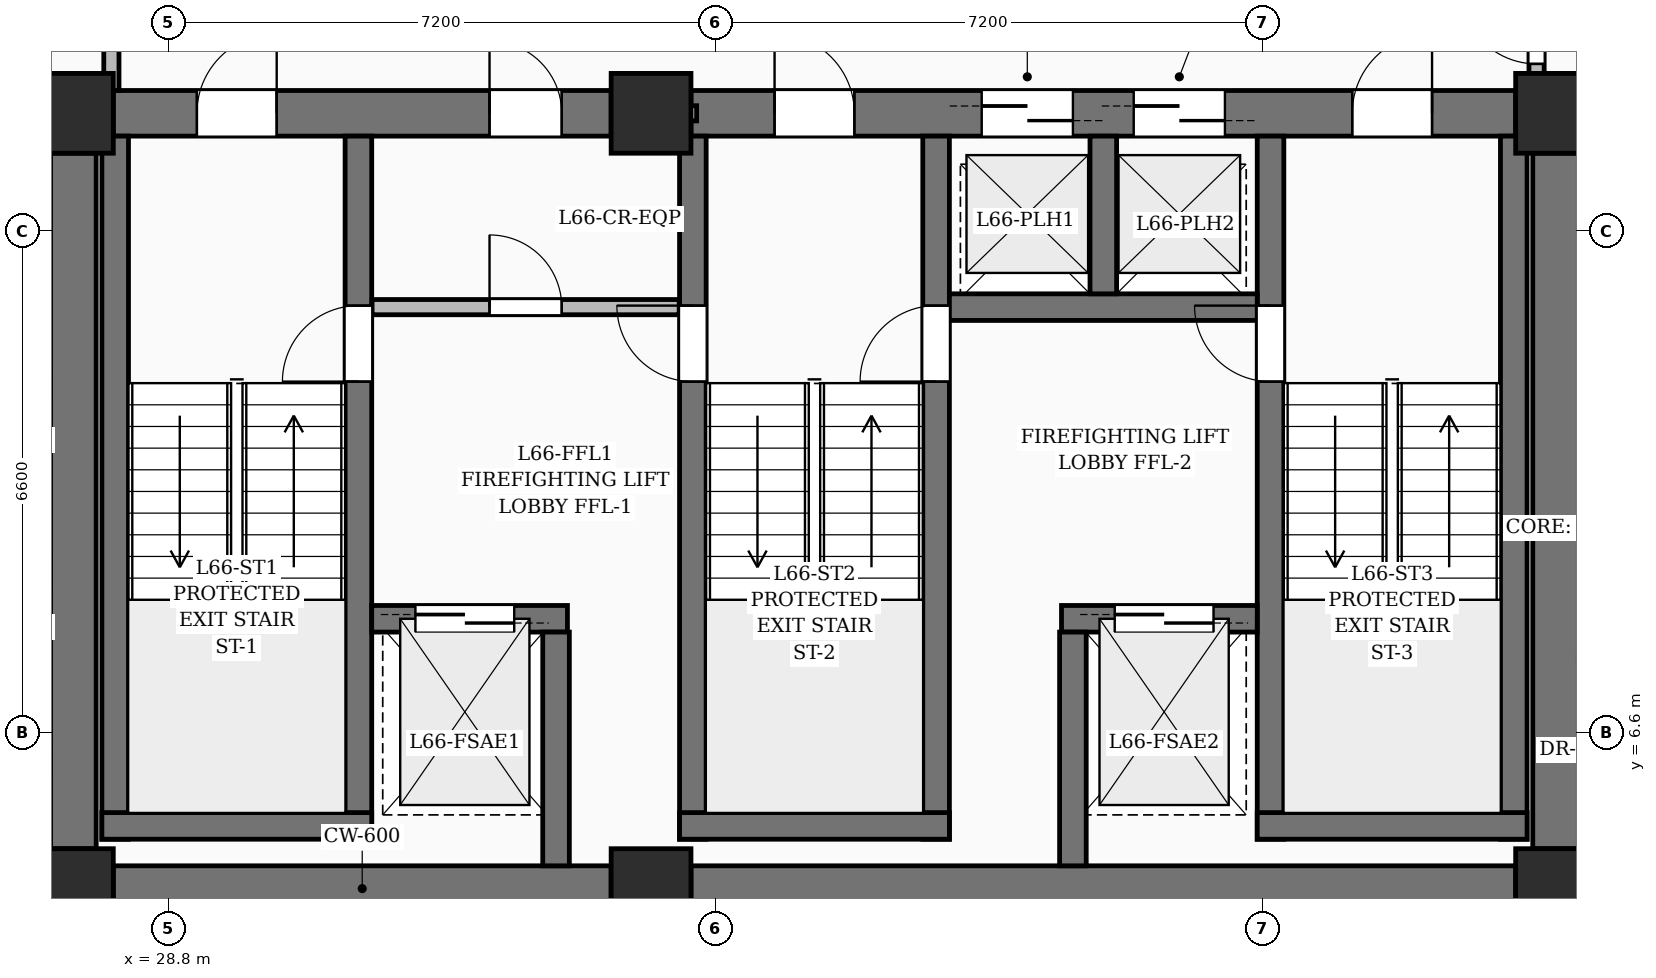
"""IFC4 building model, lengths in metres.
Left out: names, types, materials, properties, quantities, classifications, styles, units other than length and angle.
Written with IfcOpenShell. Run it as: python <this file> out.ifc"""

import sys

from ifc_helpers import new_model, si_unit, direction, frame, frame_2d, origin, origin_2d, place, context, subcontext, project, spatial, rectangle, extrude, element, fill, save


model = new_model("IFC4")
c1 = context("Model", 3, precision=1e-05, world=origin(), true_north=direction((0.0, 1.0)))
c2 = subcontext(c1, "Body", "Model", "MODEL_VIEW")
j1 = project(units=[si_unit("LENGTHUNIT", "METRE"), si_unit("PLANEANGLEUNIT", "RADIAN")], contexts=[c1])
p1 = place(None, origin())
s1 = spatial("IfcSite", under=j1, at=p1, CompositionType="ELEMENT")
p2 = place(p1, origin())
s2 = spatial("IfcBuilding", under=s1, at=p2, CompositionType="ELEMENT")
p3 = place(p2, frame((0.0, 0.0, 255.75)))
s3 = spatial("IfcBuildingStorey", under=s2, at=p3, CompositionType="ELEMENT", Elevation=255.75)
for number, where, z_axis, x_axis in (
    (1, (27.55, 4.55, 0.0), (0.0, 0.0, 1.0), (1.0, 0.0, 0.0)),
    (2, (35.15, 4.55, 0.0), (0.0, 0.0, 1.0), (1.0, 0.0, 0.0)),
    (3, (47.05, 4.55, 0.0), (0.0, 0.0, 1.0), (1.0, 0.0, 0.0)),
    (4, (27.55, 14.75, 0.0), (0.0, 0.0, 1.0), (1.0, 0.0, 0.0)),
    (5, (35.15, 14.75, 0.0), (0.0, 0.0, 1.0), (1.0, 0.0, 0.0)),
    (6, (47.05, 14.75, 0.0), (0.0, 0.0, 1.0), (1.0, 0.0, 0.0)),
):
    element("IfcColumn", number, at=place(p3, frame(where, z_axis=z_axis, x_axis=x_axis)), inside=s3, PredefinedType="COLUMN", context=c2, shape_type="SweptSolid", body=[
        extrude(rectangle(XDim=1.05, YDim=1.05, at=origin_2d()), origin(), (0.0, 0.0, 1.0), 3.75),
    ])
p4 = place(p3, frame((28.075, 4.55, 0.0), z_axis=(0.0, 0.0, 1.0), x_axis=(1.0, 0.0, 0.0)))
e7 = element("IfcWall", 7, at=p4, inside=s3, PredefinedType="SHEAR", context=c2, shape_type="SweptSolid", body=[
    extrude(rectangle(XDim=6.55, YDim=0.6, at=frame_2d((3.275, 0.0))), origin(), (0.0, 0.0, 1.0), 3.75),
])
p5 = place(p3, frame((35.675, 4.55, 0.0), z_axis=(0.0, 0.0, 1.0), x_axis=(1.0, 0.0, 0.0)))
e8 = element("IfcWall", 8, at=p5, inside=s3, PredefinedType="SHEAR", context=c2, shape_type="SweptSolid", body=[
    extrude(rectangle(XDim=10.85, YDim=0.6, at=frame_2d((5.425, 0.0))), origin(), (0.0, 0.0, 1.0), 3.75),
])
p6 = place(p3, frame((28.075, 14.75, 0.0), z_axis=(0.0, 0.0, 1.0), x_axis=(1.0, 0.0, 0.0)))
e9 = element("IfcWall", 9, at=p6, inside=s3, PredefinedType="SHEAR", context=c2, shape_type="SweptSolid", body=[
    extrude(rectangle(XDim=6.55, YDim=0.6, at=frame_2d((3.275, 0.0))), origin(), (0.0, 0.0, 1.0), 3.75),
])
p7 = place(p6, frame((1.1, 0.0, 0.0)))
e10 = element("IfcOpeningElement", 10, at=p7, cuts=e9, PredefinedType="OPENING", context=c2, shape_type="SweptSolid", body=[
    extrude(rectangle(XDim=1.05, YDim=2.15, at=frame_2d((0.525, 1.075))), frame((0.0, 0.31, 0.0), z_axis=(0.0, -1.0, 0.0), x_axis=(1.0, 0.0, 0.0)), (0.0, 0.0, 1.0), 0.62),
])
p8 = place(p6, frame((4.95, 0.0, 0.0)))
e11 = element("IfcOpeningElement", 11, at=p8, cuts=e9, PredefinedType="OPENING", context=c2, shape_type="SweptSolid", body=[
    extrude(rectangle(XDim=0.95, YDim=2.15, at=frame_2d((0.475, 1.075))), frame((0.0, 0.31, 0.0), z_axis=(0.0, -1.0, 0.0), x_axis=(1.0, 0.0, 0.0)), (0.0, 0.0, 1.0), 0.62),
])
p9 = place(p3, frame((35.675, 14.75, 0.0), z_axis=(0.0, 0.0, 1.0), x_axis=(1.0, 0.0, 0.0)))
e12 = element("IfcWall", 12, at=p9, inside=s3, PredefinedType="SHEAR", context=c2, shape_type="SweptSolid", body=[
    extrude(rectangle(XDim=10.85, YDim=0.6, at=frame_2d((5.425, 0.0))), origin(), (0.0, 0.0, 1.0), 3.75),
])
p10 = place(p9, frame((1.1, 0.0, 0.0)))
e13 = element("IfcOpeningElement", 13, at=p10, cuts=e12, PredefinedType="OPENING", context=c2, shape_type="SweptSolid", body=[
    extrude(rectangle(XDim=1.05, YDim=2.15, at=frame_2d((0.525, 1.075))), frame((0.0, 0.31, 0.0), z_axis=(0.0, -1.0, 0.0), x_axis=(1.0, 0.0, 0.0)), (0.0, 0.0, 1.0), 0.62),
])
p11 = place(p9, frame((8.7, 0.0, 0.0)))
e14 = element("IfcOpeningElement", 14, at=p11, cuts=e12, PredefinedType="OPENING", context=c2, shape_type="SweptSolid", body=[
    extrude(rectangle(XDim=1.05, YDim=2.15, at=frame_2d((0.525, 1.075))), frame((0.0, 0.31, 0.0), z_axis=(0.0, -1.0, 0.0), x_axis=(1.0, 0.0, 0.0)), (0.0, 0.0, 1.0), 0.62),
])
p12 = place(p9, frame((3.825, 0.0, 0.0)))
e15 = element("IfcOpeningElement", 15, at=p12, cuts=e12, PredefinedType="OPENING", context=c2, shape_type="SweptSolid", body=[
    extrude(rectangle(XDim=1.2, YDim=2.2, at=frame_2d((0.6, 1.1))), frame((0.0, 0.31, 0.0), z_axis=(0.0, -1.0, 0.0), x_axis=(1.0, 0.0, 0.0)), (0.0, 0.0, 1.0), 0.62),
])
p13 = place(p9, frame((5.825, 0.0, 0.0)))
e16 = element("IfcOpeningElement", 16, at=p13, cuts=e12, PredefinedType="OPENING", context=c2, shape_type="SweptSolid", body=[
    extrude(rectangle(XDim=1.2, YDim=2.2, at=frame_2d((0.6, 1.1))), frame((0.0, 0.31, 0.0), z_axis=(0.0, -1.0, 0.0), x_axis=(1.0, 0.0, 0.0)), (0.0, 0.0, 1.0), 0.62),
])
for number, where, z_axis, x_axis in (
    (17, (27.55, 5.075, 0.0), (0.0, 0.0, 1.0), (0.0, 1.0, 0.0)),
    (18, (47.05, 5.075, 0.0), (0.0, 0.0, 1.0), (0.0, 1.0, 0.0)),
):
    element("IfcWall", number, at=place(p3, frame(where, z_axis=z_axis, x_axis=x_axis)), inside=s3, PredefinedType="SHEAR", context=c2, shape_type="SweptSolid", body=[
        extrude(rectangle(XDim=9.15, YDim=0.6, at=frame_2d((4.575, 0.0))), origin(), (0.0, 0.0, 1.0), 3.75),
    ])
p14 = place(p3, frame((28.1, 5.2, 0.0), z_axis=(0.0, 0.0, 1.0), x_axis=(0.0, 1.0, 0.0)))
e19 = element("IfcWall", 19, at=p14, inside=s3, PredefinedType="SOLIDWALL", context=c2, shape_type="SweptSolid", body=[
    extrude(rectangle(XDim=9.25, YDim=0.35, at=frame_2d((4.625, 0.0))), origin(), (0.0, 0.0, 1.0), 3.75),
])
p15 = place(p3, frame((31.3, 5.2, 0.0), z_axis=(0.0, 0.0, 1.0), x_axis=(0.0, 1.0, 0.0)))
e20 = element("IfcWall", 20, at=p15, inside=s3, PredefinedType="SOLIDWALL", context=c2, shape_type="SweptSolid", body=[
    extrude(rectangle(XDim=9.25, YDim=0.35, at=frame_2d((4.625, 0.0))), origin(), (0.0, 0.0, 1.0), 3.75),
])
p16 = place(p15, frame((6.02, 0.0, 0.0)))
e21 = element("IfcOpeningElement", 21, at=p16, cuts=e20, PredefinedType="OPENING", context=c2, shape_type="SweptSolid", body=[
    extrude(rectangle(XDim=1.0, YDim=2.15, at=frame_2d((0.5, 1.075))), frame((0.0, 0.185, 0.0), z_axis=(0.0, -1.0, 0.0), x_axis=(1.0, 0.0, 0.0)), (0.0, 0.0, 1.0), 0.37),
])
p17 = place(p3, frame((27.925, 5.375, 0.0), z_axis=(0.0, 0.0, 1.0), x_axis=(1.0, 0.0, 0.0)))
e22 = element("IfcWall", 22, at=p17, inside=s3, PredefinedType="SOLIDWALL", context=c2, shape_type="SweptSolid", body=[
    extrude(rectangle(XDim=3.55, YDim=0.35, at=frame_2d((1.775, 0.0))), origin(), (0.0, 0.0, 1.0), 3.75),
])
p18 = place(p3, frame((35.7, 5.2, 0.0), z_axis=(0.0, 0.0, 1.0), x_axis=(0.0, 1.0, 0.0)))
e23 = element("IfcWall", 23, at=p18, inside=s3, PredefinedType="SOLIDWALL", context=c2, shape_type="SweptSolid", body=[
    extrude(rectangle(XDim=9.25, YDim=0.35, at=frame_2d((4.625, 0.0))), origin(), (0.0, 0.0, 1.0), 3.75),
])
p19 = place(p18, frame((6.02, 0.0, 0.0)))
e24 = element("IfcOpeningElement", 24, at=p19, cuts=e23, PredefinedType="OPENING", context=c2, shape_type="SweptSolid", body=[
    extrude(rectangle(XDim=1.0, YDim=2.15, at=frame_2d((0.5, 1.075))), frame((0.0, 0.185, 0.0), z_axis=(0.0, -1.0, 0.0), x_axis=(1.0, 0.0, 0.0)), (0.0, 0.0, 1.0), 0.37),
])
p20 = place(p3, frame((38.9, 5.2, 0.0), z_axis=(0.0, 0.0, 1.0), x_axis=(0.0, 1.0, 0.0)))
e25 = element("IfcWall", 25, at=p20, inside=s3, PredefinedType="SOLIDWALL", context=c2, shape_type="SweptSolid", body=[
    extrude(rectangle(XDim=9.25, YDim=0.35, at=frame_2d((4.625, 0.0))), origin(), (0.0, 0.0, 1.0), 3.75),
])
p21 = place(p20, frame((6.02, 0.0, 0.0)))
e26 = element("IfcOpeningElement", 26, at=p21, cuts=e25, PredefinedType="OPENING", context=c2, shape_type="SweptSolid", body=[
    extrude(rectangle(XDim=1.0, YDim=2.15, at=frame_2d((0.5, 1.075))), frame((0.0, 0.185, 0.0), z_axis=(0.0, -1.0, 0.0), x_axis=(1.0, 0.0, 0.0)), (0.0, 0.0, 1.0), 0.37),
])
p22 = place(p3, frame((35.525, 5.375, 0.0), z_axis=(0.0, 0.0, 1.0), x_axis=(1.0, 0.0, 0.0)))
e27 = element("IfcWall", 27, at=p22, inside=s3, PredefinedType="SOLIDWALL", context=c2, shape_type="SweptSolid", body=[
    extrude(rectangle(XDim=3.55, YDim=0.35, at=frame_2d((1.775, 0.0))), origin(), (0.0, 0.0, 1.0), 3.75),
])
p23 = place(p3, frame((43.3, 5.2, 0.0), z_axis=(0.0, 0.0, 1.0), x_axis=(0.0, 1.0, 0.0)))
e28 = element("IfcWall", 28, at=p23, inside=s3, PredefinedType="SOLIDWALL", context=c2, shape_type="SweptSolid", body=[
    extrude(rectangle(XDim=9.25, YDim=0.35, at=frame_2d((4.625, 0.0))), origin(), (0.0, 0.0, 1.0), 3.75),
])
p24 = place(p23, frame((6.02, 0.0, 0.0)))
e29 = element("IfcOpeningElement", 29, at=p24, cuts=e28, PredefinedType="OPENING", context=c2, shape_type="SweptSolid", body=[
    extrude(rectangle(XDim=1.0, YDim=2.15, at=frame_2d((0.5, 1.075))), frame((0.0, 0.185, 0.0), z_axis=(0.0, -1.0, 0.0), x_axis=(1.0, 0.0, 0.0)), (0.0, 0.0, 1.0), 0.37),
])
p25 = place(p3, frame((46.5, 5.2, 0.0), z_axis=(0.0, 0.0, 1.0), x_axis=(0.0, 1.0, 0.0)))
e30 = element("IfcWall", 30, at=p25, inside=s3, PredefinedType="SOLIDWALL", context=c2, shape_type="SweptSolid", body=[
    extrude(rectangle(XDim=9.25, YDim=0.35, at=frame_2d((4.625, 0.0))), origin(), (0.0, 0.0, 1.0), 3.75),
])
p26 = place(p3, frame((43.125, 5.375, 0.0), z_axis=(0.0, 0.0, 1.0), x_axis=(1.0, 0.0, 0.0)))
e31 = element("IfcWall", 31, at=p26, inside=s3, PredefinedType="SOLIDWALL", context=c2, shape_type="SweptSolid", body=[
    extrude(rectangle(XDim=3.55, YDim=0.35, at=frame_2d((1.775, 0.0))), origin(), (0.0, 0.0, 1.0), 3.75),
])
p27 = place(p3, frame((31.475, 8.1, 0.0), z_axis=(0.0, 0.0, 1.0), x_axis=(1.0, 0.0, 0.0)))
e32 = element("IfcWall", 32, at=p27, inside=s3, PredefinedType="SOLIDWALL", context=c2, shape_type="SweptSolid", body=[
    extrude(rectangle(XDim=2.575, YDim=0.35, at=frame_2d((1.288, 0.0))), origin(), (0.0, 0.0, 1.0), 3.75),
])
p28 = place(p27, frame((0.575, 0.0, 0.0)))
e33 = element("IfcOpeningElement", 33, at=p28, cuts=e32, PredefinedType="OPENING", context=c2, shape_type="SweptSolid", body=[
    extrude(rectangle(XDim=1.3, YDim=2.25, at=frame_2d((0.65, 1.125))), frame((0.0, 0.185, 0.0), z_axis=(0.0, -1.0, 0.0), x_axis=(1.0, 0.0, 0.0)), (0.0, 0.0, 1.0), 0.37),
])
p29 = place(p3, frame((40.55, 8.1, 0.0), z_axis=(0.0, 0.0, 1.0), x_axis=(1.0, 0.0, 0.0)))
e34 = element("IfcWall", 34, at=p29, inside=s3, PredefinedType="SOLIDWALL", context=c2, shape_type="SweptSolid", body=[
    extrude(rectangle(XDim=2.575, YDim=0.35, at=frame_2d((1.288, 0.0))), origin(), (0.0, 0.0, 1.0), 3.75),
])
p30 = place(p29, frame((0.7, 0.0, 0.0)))
e35 = element("IfcOpeningElement", 35, at=p30, cuts=e34, PredefinedType="OPENING", context=c2, shape_type="SweptSolid", body=[
    extrude(rectangle(XDim=1.3, YDim=2.25, at=frame_2d((0.65, 1.125))), frame((0.0, 0.185, 0.0), z_axis=(0.0, -1.0, 0.0), x_axis=(1.0, 0.0, 0.0)), (0.0, 0.0, 1.0), 0.37),
])
for number, where, z_axis, x_axis in (
    (36, (33.9, 4.85, 0.0), (0.0, 0.0, 1.0), (0.0, 1.0, 0.0)),
    (37, (40.7, 4.85, 0.0), (0.0, 0.0, 1.0), (0.0, 1.0, 0.0)),
):
    element("IfcWall", number, at=place(p3, frame(where, z_axis=z_axis, x_axis=x_axis)), inside=s3, PredefinedType="SOLIDWALL", context=c2, shape_type="SweptSolid", body=[
        extrude(rectangle(XDim=3.075, YDim=0.35, at=frame_2d((1.538, 0.0))), origin(), (0.0, 0.0, 1.0), 3.75),
    ])
p31 = place(p3, frame((39.075, 12.2, 0.0), z_axis=(0.0, 0.0, 1.0), x_axis=(1.0, 0.0, 0.0)))
e38 = element("IfcWall", 38, at=p31, inside=s3, PredefinedType="SOLIDWALL", context=c2, shape_type="SweptSolid", body=[
    extrude(rectangle(XDim=4.05, YDim=0.35, at=frame_2d((2.025, 0.0))), origin(), (0.0, 0.0, 1.0), 3.75),
])
p32 = place(p3, frame((41.1, 12.375, 0.0), z_axis=(0.0, 0.0, 1.0), x_axis=(0.0, 1.0, 0.0)))
e39 = element("IfcWall", 39, at=p32, inside=s3, PredefinedType="SOLIDWALL", context=c2, shape_type="SweptSolid", body=[
    extrude(rectangle(XDim=2.075, YDim=0.35, at=frame_2d((1.038, 0.0))), origin(), (0.0, 0.0, 1.0), 3.75),
])
p33 = place(p3, frame((34.72, 14.75, 0.0), z_axis=(0.0, 0.0, 1.0), x_axis=(1.0, 0.0, 0.0)))
e40 = element("IfcWall", 40, at=p33, inside=s3, PredefinedType="PARTITIONING", context=c2, shape_type="SweptSolid", body=[
    extrude(rectangle(XDim=1.03, YDim=0.2, at=frame_2d((0.515, 0.0))), origin(), (0.0, 0.0, 1.0), 2.685),
])
p34 = place(p3, frame((31.48, 12.2, 0.0), z_axis=(0.0, 0.0, 1.0), x_axis=(1.0, 0.0, 0.0)))
e41 = element("IfcWall", 41, at=p34, inside=s3, PredefinedType="PARTITIONING", context=c2, shape_type="SweptSolid", body=[
    extrude(rectangle(XDim=4.04, YDim=0.2, at=frame_2d((2.02, 0.0))), origin(), (0.0, 0.0, 1.0), 3.5),
])
p35 = place(p34, frame((1.545, 0.0, 0.0)))
e42 = element("IfcOpeningElement", 42, at=p35, cuts=e41, PredefinedType="OPENING", context=c2, shape_type="SweptSolid", body=[
    extrude(rectangle(XDim=0.95, YDim=2.15, at=frame_2d((0.475, 1.075))), frame((0.0, 0.11, 0.0), z_axis=(0.0, -1.0, 0.0), x_axis=(1.0, 0.0, 0.0)), (0.0, 0.0, 1.0), 0.22),
])
p36 = place(p3, frame((46.8, 15.05, 0.0), z_axis=(0.0, 0.0, 1.0), x_axis=(0.0, 1.0, 0.0)))
e43 = element("IfcWall", 43, at=p36, inside=s3, PredefinedType="PARTITIONING", context=c2, shape_type="SweptSolid", body=[
    extrude(rectangle(XDim=1.7, YDim=0.2, at=frame_2d((0.85, 0.0))), origin(), (0.0, 0.0, 1.0), 2.685),
])
p37 = place(p36, frame((0.35, 0.0, 0.0)))
e44 = element("IfcOpeningElement", 44, at=p37, cuts=e43, PredefinedType="OPENING", context=c2, shape_type="SweptSolid", body=[
    extrude(rectangle(XDim=1.0, YDim=2.2, at=frame_2d((0.5, 1.1))), frame((0.0, 0.11, 0.0), z_axis=(0.0, -1.0, 0.0), x_axis=(1.0, 0.0, 0.0)), (0.0, 0.0, 1.0), 0.22),
])
p38 = place(p3, frame((28.05, 16.51, 0.0), z_axis=(0.0, 0.0, 1.0), x_axis=(0.0, -1.0, 0.0)))
e45 = element("IfcWall", 45, at=p38, inside=s3, PredefinedType="PARTITIONING", context=c2, shape_type="SweptSolid", body=[
    extrude(rectangle(XDim=1.46, YDim=0.2, at=frame_2d((0.73, 0.0))), origin(), (0.0, 0.0, 1.0), 3.5),
])
p39 = place(p7, origin())
e46 = element("IfcDoor", 46, at=p39, inside=s3, OperationType="SINGLE_SWING_RIGHT", PredefinedType="DOOR", context=c2, shape_type="SweptSolid", body=[
    extrude(rectangle(XDim=1.05, YDim=2.15, at=frame_2d((0.525, 1.075))), frame((0.0, 0.025, 0.0), z_axis=(0.0, -1.0, 0.0), x_axis=(1.0, 0.0, 0.0)), (0.0, 0.0, 1.0), 0.05),
])
fill(e10, e46)
p40 = place(p10, origin())
e47 = element("IfcDoor", 47, at=p40, inside=s3, OperationType="SINGLE_SWING_LEFT", PredefinedType="DOOR", context=c2, shape_type="SweptSolid", body=[
    extrude(rectangle(XDim=1.05, YDim=2.15, at=frame_2d((0.525, 1.075))), frame((0.0, 0.025, 0.0), z_axis=(0.0, -1.0, 0.0), x_axis=(1.0, 0.0, 0.0)), (0.0, 0.0, 1.0), 0.05),
])
fill(e13, e47)
p41 = place(p11, origin())
e48 = element("IfcDoor", 48, at=p41, inside=s3, OperationType="SINGLE_SWING_RIGHT", PredefinedType="DOOR", context=c2, shape_type="SweptSolid", body=[
    extrude(rectangle(XDim=1.05, YDim=2.15, at=frame_2d((0.525, 1.075))), frame((0.0, 0.025, 0.0), z_axis=(0.0, -1.0, 0.0), x_axis=(1.0, 0.0, 0.0)), (0.0, 0.0, 1.0), 0.05),
])
fill(e14, e48)
p42 = place(p16, origin())
e49 = element("IfcDoor", 49, at=p42, inside=s3, OperationType="SINGLE_SWING_LEFT", PredefinedType="DOOR", context=c2, shape_type="SweptSolid", body=[
    extrude(rectangle(XDim=1.0, YDim=2.15, at=frame_2d((0.5, 1.075))), frame((0.0, 0.025, 0.0), z_axis=(0.0, -1.0, 0.0), x_axis=(1.0, 0.0, 0.0)), (0.0, 0.0, 1.0), 0.05),
])
fill(e21, e49)
p43 = place(p19, origin())
e50 = element("IfcDoor", 50, at=p43, inside=s3, OperationType="SINGLE_SWING_RIGHT", PredefinedType="DOOR", context=c2, shape_type="SweptSolid", body=[
    extrude(rectangle(XDim=1.0, YDim=2.15, at=frame_2d((0.5, 1.075))), frame((0.0, 0.025, 0.0), z_axis=(0.0, -1.0, 0.0), x_axis=(1.0, 0.0, 0.0)), (0.0, 0.0, 1.0), 0.05),
])
fill(e24, e50)
p44 = place(p21, origin())
e51 = element("IfcDoor", 51, at=p44, inside=s3, OperationType="SINGLE_SWING_LEFT", PredefinedType="DOOR", context=c2, shape_type="SweptSolid", body=[
    extrude(rectangle(XDim=1.0, YDim=2.15, at=frame_2d((0.5, 1.075))), frame((0.0, 0.025, 0.0), z_axis=(0.0, -1.0, 0.0), x_axis=(1.0, 0.0, 0.0)), (0.0, 0.0, 1.0), 0.05),
])
fill(e26, e51)
p45 = place(p24, origin())
e52 = element("IfcDoor", 52, at=p45, inside=s3, OperationType="SINGLE_SWING_RIGHT", PredefinedType="DOOR", context=c2, shape_type="SweptSolid", body=[
    extrude(rectangle(XDim=1.0, YDim=2.15, at=frame_2d((0.5, 1.075))), frame((0.0, 0.025, 0.0), z_axis=(0.0, -1.0, 0.0), x_axis=(1.0, 0.0, 0.0)), (0.0, 0.0, 1.0), 0.05),
])
fill(e29, e52)
p46 = place(p28, origin())
e53 = element("IfcDoor", 53, at=p46, inside=s3, OperationType="DOUBLE_DOOR_SLIDING", PredefinedType="DOOR", context=c2, shape_type="SweptSolid", body=[
    extrude(rectangle(XDim=1.3, YDim=2.25, at=frame_2d((0.65, 1.125))), frame((0.0, 0.025, 0.0), z_axis=(0.0, -1.0, 0.0), x_axis=(1.0, 0.0, 0.0)), (0.0, 0.0, 1.0), 0.05),
])
fill(e33, e53)
p47 = place(p30, origin())
e54 = element("IfcDoor", 54, at=p47, inside=s3, OperationType="DOUBLE_DOOR_SLIDING", PredefinedType="DOOR", context=c2, shape_type="SweptSolid", body=[
    extrude(rectangle(XDim=1.3, YDim=2.25, at=frame_2d((0.65, 1.125))), frame((0.0, 0.025, 0.0), z_axis=(0.0, -1.0, 0.0), x_axis=(1.0, 0.0, 0.0)), (0.0, 0.0, 1.0), 0.05),
])
fill(e35, e54)
p48 = place(p12, origin())
e55 = element("IfcDoor", 55, at=p48, inside=s3, OperationType="DOUBLE_DOOR_SLIDING", PredefinedType="DOOR", context=c2, shape_type="SweptSolid", body=[
    extrude(rectangle(XDim=1.2, YDim=2.2, at=frame_2d((0.6, 1.1))), frame((0.0, 0.025, 0.0), z_axis=(0.0, -1.0, 0.0), x_axis=(1.0, 0.0, 0.0)), (0.0, 0.0, 1.0), 0.05),
])
fill(e15, e55)
p49 = place(p13, origin())
e56 = element("IfcDoor", 56, at=p49, inside=s3, OperationType="DOUBLE_DOOR_SLIDING", PredefinedType="DOOR", context=c2, shape_type="SweptSolid", body=[
    extrude(rectangle(XDim=1.2, YDim=2.2, at=frame_2d((0.6, 1.1))), frame((0.0, 0.025, 0.0), z_axis=(0.0, -1.0, 0.0), x_axis=(1.0, 0.0, 0.0)), (0.0, 0.0, 1.0), 0.05),
])
fill(e16, e56)
p50 = place(p35, origin())
e57 = element("IfcDoor", 57, at=p50, inside=s3, OperationType="SINGLE_SWING_LEFT", PredefinedType="DOOR", context=c2, shape_type="SweptSolid", body=[
    extrude(rectangle(XDim=0.95, YDim=2.15, at=frame_2d((0.475, 1.075))), frame((0.0, 0.025, 0.0), z_axis=(0.0, -1.0, 0.0), x_axis=(1.0, 0.0, 0.0)), (0.0, 0.0, 1.0), 0.05),
])
fill(e42, e57)
p51 = place(p8, origin())
e58 = element("IfcDoor", 58, at=p51, inside=s3, OperationType="SINGLE_SWING_LEFT", PredefinedType="DOOR", context=c2, shape_type="SweptSolid", body=[
    extrude(rectangle(XDim=0.95, YDim=2.15, at=frame_2d((0.475, 1.075))), frame((0.0, 0.025, 0.0), z_axis=(0.0, -1.0, 0.0), x_axis=(1.0, 0.0, 0.0)), (0.0, 0.0, 1.0), 0.05),
])
fill(e11, e58)
p52 = place(p37, origin())
e59 = element("IfcDoor", 59, at=p52, inside=s3, OperationType="SINGLE_SWING_RIGHT", PredefinedType="DOOR", context=c2, shape_type="SweptSolid", body=[
    extrude(rectangle(XDim=1.0, YDim=2.2, at=frame_2d((0.5, 1.1))), frame((0.0, 0.025, 0.0), z_axis=(0.0, -1.0, 0.0), x_axis=(1.0, 0.0, 0.0)), (0.0, 0.0, 1.0), 0.05),
])
fill(e44, e59)
save(model, sys.argv[1])
